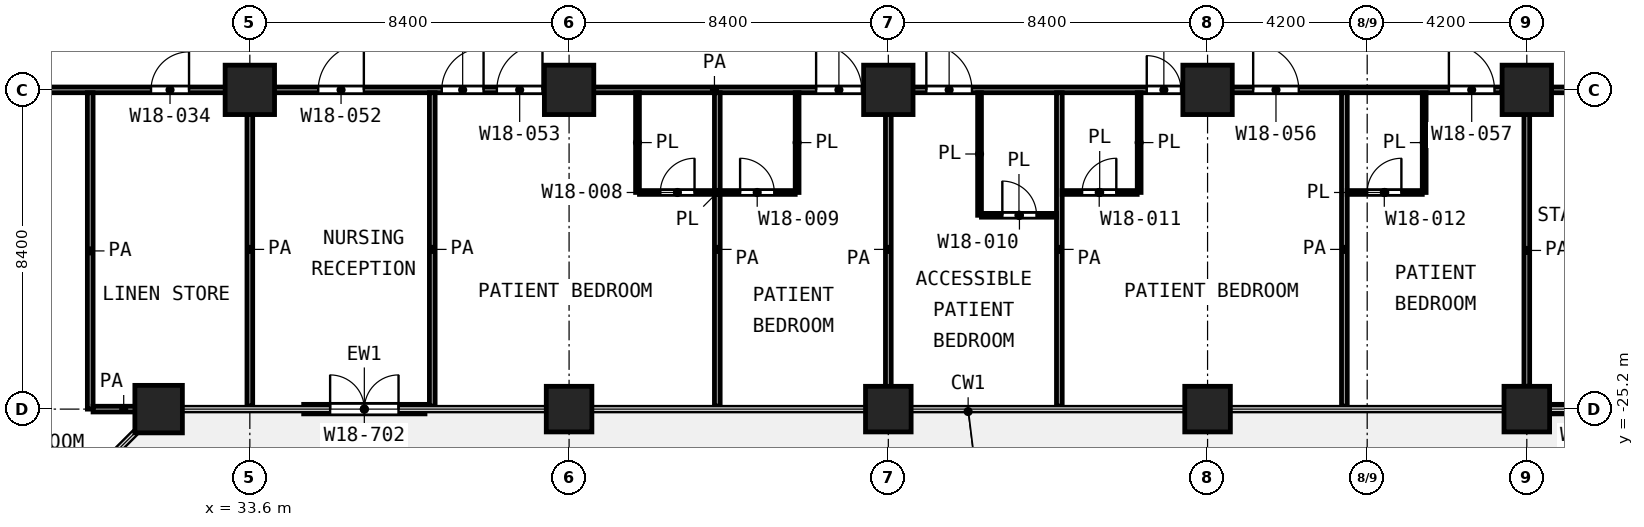
"""IFC4 building model, lengths in metres.
Left out: names, types, materials, properties, quantities, classifications, styles, units other than length and angle.
Written with IfcOpenShell. Run it as: python <this file> out.ifc"""

import sys

from ifc_helpers import new_model, si_unit, direction, frame, frame_2d, origin, origin_2d, place, context, subcontext, project, spatial, rectangle, extrude, element, fill, save


model = new_model("IFC4")
c1 = context("Model", 3, precision=1e-05, world=origin(), true_north=direction((0.0, 1.0)))
c2 = subcontext(c1, "Body", "Model", "MODEL_VIEW")
j1 = project(units=[si_unit("LENGTHUNIT", "METRE"), si_unit("PLANEANGLEUNIT", "RADIAN")], contexts=[c1])
p1 = place(None, origin())
s1 = spatial("IfcSite", under=j1, at=p1, CompositionType="ELEMENT")
p2 = place(p1, origin())
s2 = spatial("IfcBuilding", under=s1, at=p2, CompositionType="ELEMENT")
p3 = place(p2, frame((0.0, 0.0, 81.2)))
s3 = spatial("IfcBuildingStorey", under=s2, at=p3, CompositionType="ELEMENT", Elevation=81.2)
for number, where, z_axis, x_axis in (
    (1, (33.6, -16.8, 0.0), (0.0, 0.0, 1.0), (1.0, 0.0, 0.0)),
    (2, (42.0, -16.8, 0.0), (0.0, 0.0, 1.0), (1.0, 0.0, 0.0)),
    (3, (50.4, -16.8, 0.0), (0.0, 0.0, 1.0), (1.0, 0.0, 0.0)),
    (4, (58.8, -16.8, 0.0), (0.0, 0.0, 1.0), (1.0, 0.0, 0.0)),
    (5, (67.2, -16.8, 0.0), (0.0, 0.0, 1.0), (1.0, 0.0, 0.0)),
):
    element("IfcColumn", number, at=place(p3, frame(where, z_axis=z_axis, x_axis=x_axis)), inside=s3, PredefinedType="COLUMN", context=c2, shape_type="SweptSolid", body=[
        extrude(rectangle(XDim=1.3, YDim=1.3, at=origin_2d()), origin(), (0.0, 0.0, 1.0), 4.2),
    ])
p4 = place(p3, frame((31.2, -25.2, 0.0), z_axis=(0.0, 0.0, 1.0), x_axis=(1.0, 0.0, 0.0)))
e6 = element("IfcColumn", 6, at=p4, inside=s3, PredefinedType="COLUMN", context=c2, shape_type="SweptSolid", body=[
    extrude(rectangle(XDim=1.25, YDim=1.25, at=origin_2d()), origin(), (0.0, 0.0, 1.0), 4.2),
])
for number, where, z_axis, x_axis in (
    (7, (42.0, -25.2, 0.0), (0.0, 0.0, 1.0), (1.0, 0.0, 0.0)),
    (8, (50.4, -25.2, 0.0), (0.0, 0.0, 1.0), (1.0, 0.0, 0.0)),
    (9, (58.8, -25.2, 0.0), (0.0, 0.0, 1.0), (1.0, 0.0, 0.0)),
    (10, (67.2, -25.2, 0.0), (0.0, 0.0, 1.0), (1.0, 0.0, 0.0)),
):
    element("IfcColumn", number, at=place(p3, frame(where, z_axis=z_axis, x_axis=x_axis)), inside=s3, PredefinedType="COLUMN", context=c2, shape_type="SweptSolid", body=[
        extrude(rectangle(XDim=1.2, YDim=1.2, at=origin_2d()), origin(), (0.0, 0.0, 1.0), 4.2),
    ])
p5 = place(p3, frame((35.017, -25.2, 0.0), z_axis=(0.0, 0.0, 1.0), x_axis=(1.0, 0.0, 0.0)))
e11 = element("IfcWall", 11, at=p5, inside=s3, PredefinedType="SOLIDWALL", context=c2, shape_type="SweptSolid", body=[
    extrude(rectangle(XDim=3.192, YDim=0.25, at=frame_2d((1.596, 0.0))), origin(), (0.0, 0.0, 1.0), 3.78),
])
p6 = place(p5, frame((0.696, 0.0, 0.0)))
e12 = element("IfcOpeningElement", 12, at=p6, cuts=e11, PredefinedType="OPENING", context=c2, shape_type="SweptSolid", body=[
    extrude(rectangle(XDim=1.8, YDim=2.1, at=frame_2d((0.9, 1.05))), frame((0.0, 0.135, 0.0), z_axis=(0.0, -1.0, 0.0), x_axis=(1.0, 0.0, 0.0)), (0.0, 0.0, 1.0), 0.27),
])
p7 = place(p3, frame((67.8, -25.2, 0.0), z_axis=(0.0, 0.0, 1.0), x_axis=(1.0, 0.0, 0.0)))
e13 = element("IfcWall", 13, at=p7, inside=s3, PredefinedType="SOLIDWALL", context=c2, shape_type="SweptSolid", body=[
    extrude(rectangle(XDim=2.688, YDim=0.25, at=frame_2d((1.344, 0.0))), origin(), (0.0, 0.0, 1.0), 3.78),
])
p8 = place(p7, frame((0.444, 0.0, 0.0)))
e14 = element("IfcOpeningElement", 14, at=p8, cuts=e13, PredefinedType="OPENING", context=c2, shape_type="SweptSolid", body=[
    extrude(rectangle(XDim=1.8, YDim=2.1, at=frame_2d((0.9, 1.05))), frame((0.0, 0.135, 0.0), z_axis=(0.0, -1.0, 0.0), x_axis=(1.0, 0.0, 0.0)), (0.0, 0.0, 1.0), 0.27),
])
p9 = place(p3, frame((52.85, -20.1, 0.0), z_axis=(0.0, 0.0, 1.0), x_axis=(1.0, 0.0, 0.0)))
e15 = element("IfcWall", 15, at=p9, inside=s3, PredefinedType="PARTITIONING", context=c2, shape_type="SweptSolid", body=[
    extrude(rectangle(XDim=1.975, YDim=0.1, at=frame_2d((0.987, 0.0))), origin(), (0.0, 0.0, 1.0), 3.9),
])
p10 = place(p9, frame((0.55, 0.0, 0.0)))
e16 = element("IfcOpeningElement", 16, at=p10, cuts=e15, PredefinedType="OPENING", context=c2, shape_type="SweptSolid", body=[
    extrude(rectangle(XDim=0.9, YDim=2.1, at=frame_2d((0.45, 1.05))), frame((0.0, 0.06, 0.0), z_axis=(0.0, -1.0, 0.0), x_axis=(1.0, 0.0, 0.0)), (0.0, 0.0, 1.0), 0.12),
])
p11 = place(p3, frame((43.852, -19.5, 0.0), z_axis=(0.0, 0.0, 1.0), x_axis=(1.0, 0.0, 0.0)))
e17 = element("IfcWall", 17, at=p11, inside=s3, PredefinedType="PARTITIONING", context=c2, shape_type="SweptSolid", body=[
    extrude(rectangle(XDim=4.098, YDim=0.1, at=frame_2d((2.049, 0.0))), origin(), (0.0, 0.0, 1.0), 3.9),
])
p12 = place(p11, frame((0.549, 0.0, 0.0)))
e18 = element("IfcOpeningElement", 18, at=p12, cuts=e17, PredefinedType="OPENING", context=c2, shape_type="SweptSolid", body=[
    extrude(rectangle(XDim=0.9, YDim=2.1, at=frame_2d((0.45, 1.05))), frame((0.0, 0.06, 0.0), z_axis=(0.0, -1.0, 0.0), x_axis=(1.0, 0.0, 0.0)), (0.0, 0.0, 1.0), 0.12),
])
p13 = place(p11, frame((2.648, 0.0, 0.0)))
e19 = element("IfcOpeningElement", 19, at=p13, cuts=e17, PredefinedType="OPENING", context=c2, shape_type="SweptSolid", body=[
    extrude(rectangle(XDim=0.9, YDim=2.1, at=frame_2d((0.45, 1.05))), frame((0.0, 0.06, 0.0), z_axis=(0.0, -1.0, 0.0), x_axis=(1.0, 0.0, 0.0)), (0.0, 0.0, 1.0), 0.12),
])
p14 = place(p3, frame((54.975, -19.5, 0.0), z_axis=(0.0, 0.0, 1.0), x_axis=(1.0, 0.0, 0.0)))
e20 = element("IfcWall", 20, at=p14, inside=s3, PredefinedType="PARTITIONING", context=c2, shape_type="SweptSolid", body=[
    extrude(rectangle(XDim=1.973, YDim=0.1, at=frame_2d((0.986, 0.0))), origin(), (0.0, 0.0, 1.0), 3.9),
])
p15 = place(p14, frame((0.524, 0.0, 0.0)))
e21 = element("IfcOpeningElement", 21, at=p15, cuts=e20, PredefinedType="OPENING", context=c2, shape_type="SweptSolid", body=[
    extrude(rectangle(XDim=0.9, YDim=2.1, at=frame_2d((0.45, 1.05))), frame((0.0, 0.06, 0.0), z_axis=(0.0, -1.0, 0.0), x_axis=(1.0, 0.0, 0.0)), (0.0, 0.0, 1.0), 0.12),
])
p16 = place(p3, frame((62.475, -19.5, 0.0), z_axis=(0.0, 0.0, 1.0), x_axis=(1.0, 0.0, 0.0)))
e22 = element("IfcWall", 22, at=p16, inside=s3, PredefinedType="PARTITIONING", context=c2, shape_type="SweptSolid", body=[
    extrude(rectangle(XDim=1.975, YDim=0.1, at=frame_2d((0.987, 0.0))), origin(), (0.0, 0.0, 1.0), 3.9),
])
p17 = place(p16, frame((0.525, 0.0, 0.0)))
e23 = element("IfcOpeningElement", 23, at=p17, cuts=e22, PredefinedType="OPENING", context=c2, shape_type="SweptSolid", body=[
    extrude(rectangle(XDim=0.9, YDim=2.1, at=frame_2d((0.45, 1.05))), frame((0.0, 0.06, 0.0), z_axis=(0.0, -1.0, 0.0), x_axis=(1.0, 0.0, 0.0)), (0.0, 0.0, 1.0), 0.12),
])
p18 = place(p3, frame((43.8, -19.499, 0.0), z_axis=(0.0, 0.0, 1.0), x_axis=(0.0, 1.0, 0.0)))
e24 = element("IfcWall", 24, at=p18, inside=s3, PredefinedType="PARTITIONING", context=c2, shape_type="SweptSolid", body=[
    extrude(rectangle(XDim=2.624, YDim=0.1, at=frame_2d((1.312, 0.0))), origin(), (0.0, 0.0, 1.0), 3.9),
])
p19 = place(p3, frame((48.0, -19.5, 0.0), z_axis=(0.0, 0.0, 1.0), x_axis=(0.0, 1.0, 0.0)))
e25 = element("IfcWall", 25, at=p19, inside=s3, PredefinedType="PARTITIONING", context=c2, shape_type="SweptSolid", body=[
    extrude(rectangle(XDim=2.625, YDim=0.1, at=frame_2d((1.312, 0.0))), origin(), (0.0, 0.0, 1.0), 3.9),
])
p20 = place(p3, frame((52.8, -20.1, 0.0), z_axis=(0.0, 0.0, 1.0), x_axis=(0.0, 1.0, 0.0)))
e26 = element("IfcWall", 26, at=p20, inside=s3, PredefinedType="PARTITIONING", context=c2, shape_type="SweptSolid", body=[
    extrude(rectangle(XDim=3.225, YDim=0.1, at=frame_2d((1.613, 0.0))), origin(), (0.0, 0.0, 1.0), 3.9),
])
p21 = place(p3, frame((57.0, -19.499, 0.0), z_axis=(0.0, 0.0, 1.0), x_axis=(0.0, 1.0, 0.0)))
e27 = element("IfcWall", 27, at=p21, inside=s3, PredefinedType="PARTITIONING", context=c2, shape_type="SweptSolid", body=[
    extrude(rectangle(XDim=2.624, YDim=0.1, at=frame_2d((1.312, 0.0))), origin(), (0.0, 0.0, 1.0), 3.9),
])
p22 = place(p3, frame((64.5, -19.5, 0.0), z_axis=(0.0, 0.0, 1.0), x_axis=(0.0, 1.0, 0.0)))
e28 = element("IfcWall", 28, at=p22, inside=s3, PredefinedType="PARTITIONING", context=c2, shape_type="SweptSolid", body=[
    extrude(rectangle(XDim=2.625, YDim=0.1, at=frame_2d((1.312, 0.0))), origin(), (0.0, 0.0, 1.0), 3.9),
])
p23 = place(p3, frame((29.475, -25.2, 0.0), z_axis=(0.0, 0.0, 1.0), x_axis=(1.0, 0.0, 0.0)))
e29 = element("IfcWall", 29, at=p23, inside=s3, PredefinedType="PARTITIONING", context=c2, shape_type="SweptSolid", body=[
    extrude(rectangle(XDim=1.612, YDim=0.15, at=frame_2d((0.806, 0.0))), origin(), (0.0, 0.0, 1.0), 3.9),
])
p24 = place(p3, frame((25.1, -16.8, 0.0), z_axis=(0.0, 0.0, 1.0), x_axis=(1.0, 0.0, 0.0)))
e30 = element("IfcWall", 30, at=p24, inside=s3, PredefinedType="PARTITIONING", context=c2, shape_type="SweptSolid", body=[
    extrude(rectangle(XDim=41.45, YDim=0.15, at=frame_2d((20.725, 0.0))), origin(), (0.0, 0.0, 1.0), 3.9),
])
p25 = place(p24, frame((1.45, 0.0, 0.0)))
e31 = element("IfcOpeningElement", 31, at=p25, cuts=e30, PredefinedType="OPENING", context=c2, shape_type="SweptSolid", body=[
    extrude(rectangle(XDim=1.5, YDim=2.1, at=frame_2d((0.75, 1.05))), frame((0.0, 0.085, 0.0), z_axis=(0.0, -1.0, 0.0), x_axis=(1.0, 0.0, 0.0)), (0.0, 0.0, 1.0), 0.17),
])
p26 = place(p24, frame((5.9, 0.0, 0.0)))
e32 = element("IfcOpeningElement", 32, at=p26, cuts=e30, PredefinedType="OPENING", context=c2, shape_type="SweptSolid", body=[
    extrude(rectangle(XDim=1.0, YDim=2.1, at=frame_2d((0.5, 1.05))), frame((0.0, 0.085, 0.0), z_axis=(0.0, -1.0, 0.0), x_axis=(1.0, 0.0, 0.0)), (0.0, 0.0, 1.0), 0.17),
])
p27 = place(p24, frame((10.3, 0.0, 0.0)))
e33 = element("IfcOpeningElement", 33, at=p27, cuts=e30, PredefinedType="OPENING", context=c2, shape_type="SweptSolid", body=[
    extrude(rectangle(XDim=1.2, YDim=2.1, at=frame_2d((0.6, 1.05))), frame((0.0, 0.085, 0.0), z_axis=(0.0, -1.0, 0.0), x_axis=(1.0, 0.0, 0.0)), (0.0, 0.0, 1.0), 0.17),
])
p28 = place(p24, frame((15.0, 0.0, 0.0)))
e34 = element("IfcOpeningElement", 34, at=p28, cuts=e30, PredefinedType="OPENING", context=c2, shape_type="SweptSolid", body=[
    extrude(rectangle(XDim=1.2, YDim=2.1, at=frame_2d((0.6, 1.05))), frame((0.0, 0.085, 0.0), z_axis=(0.0, -1.0, 0.0), x_axis=(1.0, 0.0, 0.0)), (0.0, 0.0, 1.0), 0.17),
])
p29 = place(p24, frame((13.55, 0.0, 0.0)))
e35 = element("IfcOpeningElement", 35, at=p29, cuts=e30, PredefinedType="OPENING", context=c2, shape_type="SweptSolid", body=[
    extrude(rectangle(XDim=1.1, YDim=2.1, at=frame_2d((0.55, 1.05))), frame((0.0, 0.085, 0.0), z_axis=(0.0, -1.0, 0.0), x_axis=(1.0, 0.0, 0.0)), (0.0, 0.0, 1.0), 0.17),
])
p30 = place(p24, frame((23.4, 0.0, 0.0)))
e36 = element("IfcOpeningElement", 36, at=p30, cuts=e30, PredefinedType="OPENING", context=c2, shape_type="SweptSolid", body=[
    extrude(rectangle(XDim=1.2, YDim=2.1, at=frame_2d((0.6, 1.05))), frame((0.0, 0.085, 0.0), z_axis=(0.0, -1.0, 0.0), x_axis=(1.0, 0.0, 0.0)), (0.0, 0.0, 1.0), 0.17),
])
p31 = place(p24, frame((26.3, 0.0, 0.0)))
e37 = element("IfcOpeningElement", 37, at=p31, cuts=e30, PredefinedType="OPENING", context=c2, shape_type="SweptSolid", body=[
    extrude(rectangle(XDim=1.2, YDim=2.1, at=frame_2d((0.6, 1.05))), frame((0.0, 0.085, 0.0), z_axis=(0.0, -1.0, 0.0), x_axis=(1.0, 0.0, 0.0)), (0.0, 0.0, 1.0), 0.17),
])
p32 = place(p24, frame((34.9, 0.0, 0.0)))
e38 = element("IfcOpeningElement", 38, at=p32, cuts=e30, PredefinedType="OPENING", context=c2, shape_type="SweptSolid", body=[
    extrude(rectangle(XDim=1.2, YDim=2.1, at=frame_2d((0.6, 1.05))), frame((0.0, 0.085, 0.0), z_axis=(0.0, -1.0, 0.0), x_axis=(1.0, 0.0, 0.0)), (0.0, 0.0, 1.0), 0.17),
])
p33 = place(p24, frame((32.1, 0.0, 0.0)))
e39 = element("IfcOpeningElement", 39, at=p33, cuts=e30, PredefinedType="OPENING", context=c2, shape_type="SweptSolid", body=[
    extrude(rectangle(XDim=0.9, YDim=2.1, at=frame_2d((0.45, 1.05))), frame((0.0, 0.085, 0.0), z_axis=(0.0, -1.0, 0.0), x_axis=(1.0, 0.0, 0.0)), (0.0, 0.0, 1.0), 0.17),
])
p34 = place(p24, frame((40.05, 0.0, 0.0)))
e40 = element("IfcOpeningElement", 40, at=p34, cuts=e30, PredefinedType="OPENING", context=c2, shape_type="SweptSolid", body=[
    extrude(rectangle(XDim=1.2, YDim=2.1, at=frame_2d((0.6, 1.05))), frame((0.0, 0.085, 0.0), z_axis=(0.0, -1.0, 0.0), x_axis=(1.0, 0.0, 0.0)), (0.0, 0.0, 1.0), 0.17),
])
p35 = place(p3, frame((67.85, -16.8, 0.0), z_axis=(0.0, 0.0, 1.0), x_axis=(1.0, 0.0, 0.0)))
e41 = element("IfcWall", 41, at=p35, inside=s3, PredefinedType="PARTITIONING", context=c2, shape_type="SweptSolid", body=[
    extrude(rectangle(XDim=11.87, YDim=0.15, at=frame_2d((5.935, 0.0))), origin(), (0.0, 0.0, 1.0), 3.9),
])
p36 = place(p35, frame((1.325, 0.0, 0.0)))
e42 = element("IfcOpeningElement", 42, at=p36, cuts=e41, PredefinedType="OPENING", context=c2, shape_type="SweptSolid", body=[
    extrude(rectangle(XDim=0.9, YDim=2.1, at=frame_2d((0.45, 1.05))), frame((0.0, 0.085, 0.0), z_axis=(0.0, -1.0, 0.0), x_axis=(1.0, 0.0, 0.0)), (0.0, 0.0, 1.0), 0.17),
])
p37 = place(p35, frame((5.85, 0.0, 0.0)))
e43 = element("IfcOpeningElement", 43, at=p37, cuts=e41, PredefinedType="OPENING", context=c2, shape_type="SweptSolid", body=[
    extrude(rectangle(XDim=1.2, YDim=2.1, at=frame_2d((0.6, 1.05))), frame((0.0, 0.085, 0.0), z_axis=(0.0, -1.0, 0.0), x_axis=(1.0, 0.0, 0.0)), (0.0, 0.0, 1.0), 0.17),
])
p38 = place(p35, frame((9.35, 0.0, 0.0)))
e44 = element("IfcOpeningElement", 44, at=p38, cuts=e41, PredefinedType="OPENING", context=c2, shape_type="SweptSolid", body=[
    extrude(rectangle(XDim=1.0, YDim=2.1, at=frame_2d((0.5, 1.05))), frame((0.0, 0.085, 0.0), z_axis=(0.0, -1.0, 0.0), x_axis=(1.0, 0.0, 0.0)), (0.0, 0.0, 1.0), 0.17),
])
p39 = place(p3, frame((29.4, -25.2, 0.0), z_axis=(0.0, 0.0, 1.0), x_axis=(0.0, 1.0, 0.0)))
e45 = element("IfcWall", 45, at=p39, inside=s3, PredefinedType="PARTITIONING", context=c2, shape_type="SweptSolid", body=[
    extrude(rectangle(XDim=8.325, YDim=0.15, at=frame_2d((4.163, 0.0))), origin(), (0.0, 0.0, 1.0), 3.9),
])
for number, where, z_axis, x_axis in (
    (46, (33.6, -25.12, 0.0), (0.0, 0.0, 1.0), (0.0, 1.0, 0.0)),
    (47, (38.4, -25.12, 0.0), (0.0, 0.0, 1.0), (0.0, 1.0, 0.0)),
    (48, (45.9, -25.12, 0.0), (0.0, 0.0, 1.0), (0.0, 1.0, 0.0)),
    (49, (50.4, -25.12, 0.0), (0.0, 0.0, 1.0), (0.0, 1.0, 0.0)),
    (50, (54.9, -25.12, 0.0), (0.0, 0.0, 1.0), (0.0, 1.0, 0.0)),
    (51, (62.4, -25.12, 0.0), (0.0, 0.0, 1.0), (0.0, 1.0, 0.0)),
):
    element("IfcWall", number, at=place(p3, frame(where, z_axis=z_axis, x_axis=x_axis)), inside=s3, PredefinedType="PARTITIONING", context=c2, shape_type="SweptSolid", body=[
        extrude(rectangle(XDim=8.245, YDim=0.15, at=frame_2d((4.123, 0.0))), origin(), (0.0, 0.0, 1.0), 3.9),
    ])
p40 = place(p3, frame((67.2, -24.6, 0.0), z_axis=(0.0, 0.0, 1.0), x_axis=(0.0, 1.0, 0.0)))
e52 = element("IfcWall", 52, at=p40, inside=s3, PredefinedType="PARTITIONING", context=c2, shape_type="SweptSolid", body=[
    extrude(rectangle(XDim=7.15, YDim=0.15, at=frame_2d((3.575, 0.0))), origin(), (0.0, 0.0, 1.0), 3.9),
])
p41 = place(p6, origin())
e53 = element("IfcDoor", 53, at=p41, inside=s3, OperationType="DOUBLE_DOOR_SINGLE_SWING", PredefinedType="DOOR", context=c2, shape_type="SweptSolid", body=[
    extrude(rectangle(XDim=1.8, YDim=2.1, at=frame_2d((0.9, 1.05))), frame((0.0, 0.025, 0.0), z_axis=(0.0, -1.0, 0.0), x_axis=(1.0, 0.0, 0.0)), (0.0, 0.0, 1.0), 0.05),
])
fill(e12, e53)
p42 = place(p26, origin())
e54 = element("IfcDoor", 54, at=p42, inside=s3, OperationType="SINGLE_SWING_RIGHT", PredefinedType="DOOR", context=c2, shape_type="SweptSolid", body=[
    extrude(rectangle(XDim=1.0, YDim=2.1, at=frame_2d((0.5, 1.05))), frame((0.0, 0.025, 0.0), z_axis=(0.0, -1.0, 0.0), x_axis=(1.0, 0.0, 0.0)), (0.0, 0.0, 1.0), 0.05),
])
fill(e32, e54)
p43 = place(p27, origin())
e55 = element("IfcDoor", 55, at=p43, inside=s3, OperationType="SINGLE_SWING_RIGHT", PredefinedType="DOOR", context=c2, shape_type="SweptSolid", body=[
    extrude(rectangle(XDim=1.2, YDim=2.1, at=frame_2d((0.6, 1.05))), frame((0.0, 0.025, 0.0), z_axis=(0.0, -1.0, 0.0), x_axis=(1.0, 0.0, 0.0)), (0.0, 0.0, 1.0), 0.05),
])
fill(e33, e55)
p44 = place(p28, origin())
e56 = element("IfcDoor", 56, at=p44, inside=s3, OperationType="SINGLE_SWING_RIGHT", PredefinedType="DOOR", context=c2, shape_type="SweptSolid", body=[
    extrude(rectangle(XDim=1.2, YDim=2.1, at=frame_2d((0.6, 1.05))), frame((0.0, 0.025, 0.0), z_axis=(0.0, -1.0, 0.0), x_axis=(1.0, 0.0, 0.0)), (0.0, 0.0, 1.0), 0.05),
])
fill(e34, e56)
p45 = place(p29, origin())
e57 = element("IfcDoor", 57, at=p45, inside=s3, OperationType="SINGLE_SWING_RIGHT", PredefinedType="DOOR", context=c2, shape_type="SweptSolid", body=[
    extrude(rectangle(XDim=1.1, YDim=2.1, at=frame_2d((0.55, 1.05))), frame((0.0, 0.025, 0.0), z_axis=(0.0, -1.0, 0.0), x_axis=(1.0, 0.0, 0.0)), (0.0, 0.0, 1.0), 0.05),
])
fill(e35, e57)
p46 = place(p12, origin())
e58 = element("IfcDoor", 58, at=p46, inside=s3, OperationType="SINGLE_SWING_RIGHT", PredefinedType="DOOR", context=c2, shape_type="SweptSolid", body=[
    extrude(rectangle(XDim=0.9, YDim=2.1, at=frame_2d((0.45, 1.05))), frame((0.0, 0.025, 0.0), z_axis=(0.0, -1.0, 0.0), x_axis=(1.0, 0.0, 0.0)), (0.0, 0.0, 1.0), 0.05),
])
fill(e18, e58)
p47 = place(p30, origin())
e59 = element("IfcDoor", 59, at=p47, inside=s3, OperationType="SINGLE_SWING_LEFT", PredefinedType="DOOR", context=c2, shape_type="SweptSolid", body=[
    extrude(rectangle(XDim=1.2, YDim=2.1, at=frame_2d((0.6, 1.05))), frame((0.0, 0.025, 0.0), z_axis=(0.0, -1.0, 0.0), x_axis=(1.0, 0.0, 0.0)), (0.0, 0.0, 1.0), 0.05),
])
fill(e36, e59)
p48 = place(p13, origin())
e60 = element("IfcDoor", 60, at=p48, inside=s3, OperationType="SINGLE_SWING_LEFT", PredefinedType="DOOR", context=c2, shape_type="SweptSolid", body=[
    extrude(rectangle(XDim=0.9, YDim=2.1, at=frame_2d((0.45, 1.05))), frame((0.0, 0.025, 0.0), z_axis=(0.0, -1.0, 0.0), x_axis=(1.0, 0.0, 0.0)), (0.0, 0.0, 1.0), 0.05),
])
fill(e19, e60)
p49 = place(p31, origin())
e61 = element("IfcDoor", 61, at=p49, inside=s3, OperationType="SINGLE_SWING_LEFT", PredefinedType="DOOR", context=c2, shape_type="SweptSolid", body=[
    extrude(rectangle(XDim=1.2, YDim=2.1, at=frame_2d((0.6, 1.05))), frame((0.0, 0.025, 0.0), z_axis=(0.0, -1.0, 0.0), x_axis=(1.0, 0.0, 0.0)), (0.0, 0.0, 1.0), 0.05),
])
fill(e37, e61)
p50 = place(p10, origin())
e62 = element("IfcDoor", 62, at=p50, inside=s3, OperationType="SINGLE_SWING_LEFT", PredefinedType="DOOR", context=c2, shape_type="SweptSolid", body=[
    extrude(rectangle(XDim=0.9, YDim=2.1, at=frame_2d((0.45, 1.05))), frame((0.0, 0.025, 0.0), z_axis=(0.0, -1.0, 0.0), x_axis=(1.0, 0.0, 0.0)), (0.0, 0.0, 1.0), 0.05),
])
fill(e16, e62)
p51 = place(p32, origin())
e63 = element("IfcDoor", 63, at=p51, inside=s3, OperationType="SINGLE_SWING_LEFT", PredefinedType="DOOR", context=c2, shape_type="SweptSolid", body=[
    extrude(rectangle(XDim=1.2, YDim=2.1, at=frame_2d((0.6, 1.05))), frame((0.0, 0.025, 0.0), z_axis=(0.0, -1.0, 0.0), x_axis=(1.0, 0.0, 0.0)), (0.0, 0.0, 1.0), 0.05),
])
fill(e38, e63)
p52 = place(p33, origin())
e64 = element("IfcDoor", 64, at=p52, inside=s3, OperationType="SINGLE_SWING_LEFT", PredefinedType="DOOR", context=c2, shape_type="SweptSolid", body=[
    extrude(rectangle(XDim=0.9, YDim=2.1, at=frame_2d((0.45, 1.05))), frame((0.0, 0.025, 0.0), z_axis=(0.0, -1.0, 0.0), x_axis=(1.0, 0.0, 0.0)), (0.0, 0.0, 1.0), 0.05),
])
fill(e39, e64)
p53 = place(p15, origin())
e65 = element("IfcDoor", 65, at=p53, inside=s3, OperationType="SINGLE_SWING_RIGHT", PredefinedType="DOOR", context=c2, shape_type="SweptSolid", body=[
    extrude(rectangle(XDim=0.9, YDim=2.1, at=frame_2d((0.45, 1.05))), frame((0.0, 0.025, 0.0), z_axis=(0.0, -1.0, 0.0), x_axis=(1.0, 0.0, 0.0)), (0.0, 0.0, 1.0), 0.05),
])
fill(e21, e65)
p54 = place(p34, origin())
e66 = element("IfcDoor", 66, at=p54, inside=s3, OperationType="SINGLE_SWING_LEFT", PredefinedType="DOOR", context=c2, shape_type="SweptSolid", body=[
    extrude(rectangle(XDim=1.2, YDim=2.1, at=frame_2d((0.6, 1.05))), frame((0.0, 0.025, 0.0), z_axis=(0.0, -1.0, 0.0), x_axis=(1.0, 0.0, 0.0)), (0.0, 0.0, 1.0), 0.05),
])
fill(e40, e66)
p55 = place(p17, origin())
e67 = element("IfcDoor", 67, at=p55, inside=s3, OperationType="SINGLE_SWING_RIGHT", PredefinedType="DOOR", context=c2, shape_type="SweptSolid", body=[
    extrude(rectangle(XDim=0.9, YDim=2.1, at=frame_2d((0.45, 1.05))), frame((0.0, 0.025, 0.0), z_axis=(0.0, -1.0, 0.0), x_axis=(1.0, 0.0, 0.0)), (0.0, 0.0, 1.0), 0.05),
])
fill(e23, e67)
save(model, sys.argv[1])
